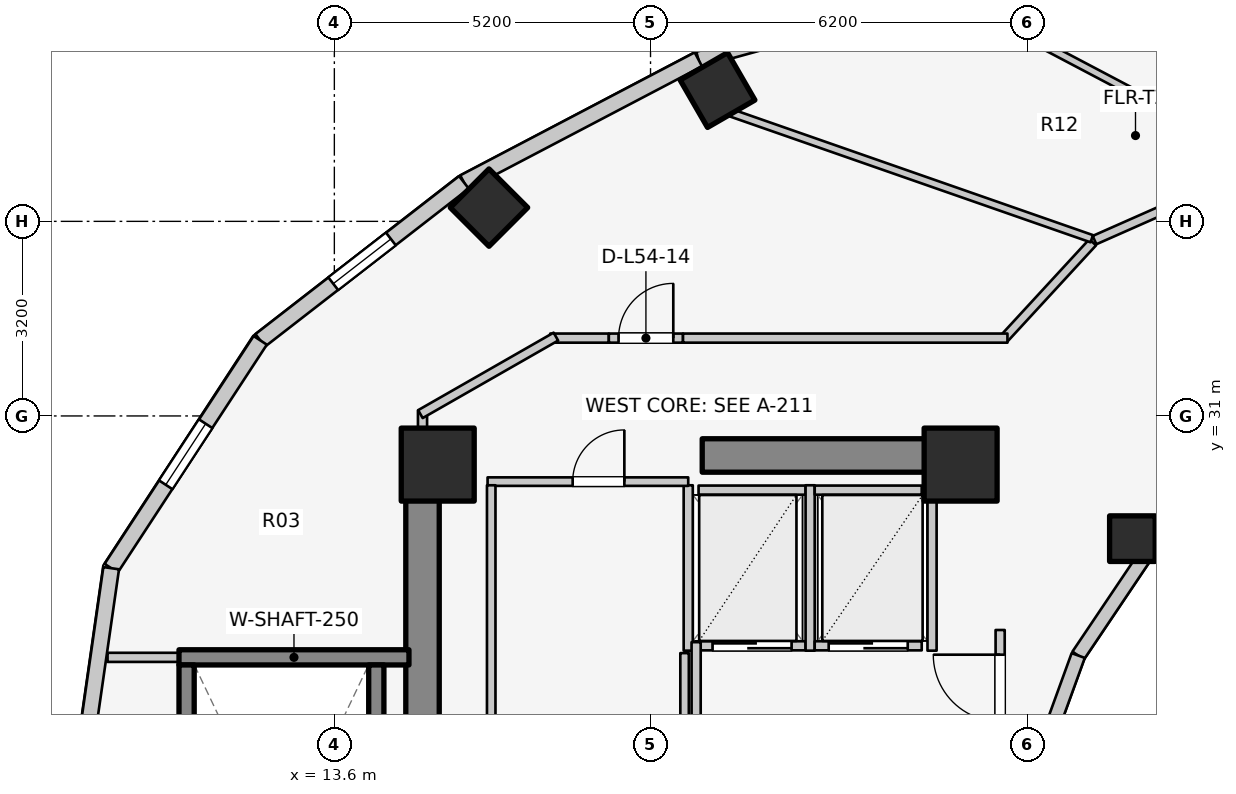
"""IFC4 building model, lengths in metres.
Left out: names, types, materials, properties, quantities, classifications, styles, units other than length and angle.
Written with IfcOpenShell. Run it as: python <this file> out.ifc"""

import sys

from ifc_helpers import new_model, si_unit, direction, frame, frame_2d, origin, origin_2d, place, context, subcontext, project, spatial, rectangle, extrude, element, fill, save


model = new_model("IFC4")
c1 = context("Model", 3, precision=1e-05, world=origin(), true_north=direction((0.0, 1.0)))
c2 = subcontext(c1, "Body", "Model", "MODEL_VIEW")
j1 = project(units=[si_unit("LENGTHUNIT", "METRE"), si_unit("PLANEANGLEUNIT", "RADIAN")], contexts=[c1])
p1 = place(None, origin())
s1 = spatial("IfcSite", under=j1, at=p1, CompositionType="ELEMENT")
p2 = place(p1, origin())
s2 = spatial("IfcBuilding", under=s1, at=p2, CompositionType="ELEMENT")
p3 = place(p2, frame((0.0, 0.0, 177.7)))
s3 = spatial("IfcBuildingStorey", under=s2, at=p3, CompositionType="ELEMENT", Elevation=177.7)
p4 = place(p3, frame((15.05, 17.05, 0.0), z_axis=(0.0, 0.0, 1.0), x_axis=(0.0, 1.0, 0.0)))
e1 = element("IfcWall", 1, at=p4, inside=s3, PredefinedType="SHEAR", context=c2, shape_type="SweptSolid", body=[
    extrude(rectangle(XDim=12.8, YDim=0.55, at=frame_2d((6.4, 0.0))), origin(), (0.0, 0.0, 1.0), 3.1),
])
p5 = place(p3, frame((19.65, 30.35, 0.0), z_axis=(0.0, 0.0, 1.0), x_axis=(1.0, 0.0, 0.0)))
e2 = element("IfcWall", 2, at=p5, inside=s3, PredefinedType="SHEAR", context=c2, shape_type="SweptSolid", body=[
    extrude(rectangle(XDim=4.5, YDim=0.55, at=frame_2d((2.25, 0.0))), origin(), (0.0, 0.0, 1.0), 3.1),
])
p6 = place(p3, frame((11.045, 27.03, 0.0), z_axis=(0.0, 0.0, 1.0), x_axis=(1.0, 0.0, 0.0)))
e3 = element("IfcWall", 3, at=p6, inside=s3, PredefinedType="SOLIDWALL", context=c2, shape_type="SweptSolid", body=[
    extrude(rectangle(XDim=3.782, YDim=0.25, at=frame_2d((1.891, 0.0))), origin(), (0.0, 0.0, 1.0), 3.1),
])
for number, where, z_axis, x_axis in (
    (4, (11.17, 19.095, 0.0), (0.0, 0.0, 1.0), (0.0, 1.0, 0.0)),
    (5, (14.29, 19.095, 0.0), (0.0, 0.0, 1.0), (0.0, 1.0, 0.0)),
):
    element("IfcWall", number, at=place(p3, frame(where, z_axis=z_axis, x_axis=x_axis)), inside=s3, PredefinedType="SOLIDWALL", context=c2, shape_type="SweptSolid", body=[
        extrude(rectangle(XDim=7.81, YDim=0.25, at=frame_2d((3.905, 0.0))), origin(), (0.0, 0.0, 1.0), 3.1),
    ])
for number, where, z_axis, x_axis in (
    (6, (23.9, 30.2, 0.0), (0.0, 0.0, 1.0), (1.0, 0.0, 0.0)),
    (7, (15.3, 30.2, 0.0), (0.0, 0.0, 1.0), (1.0, 0.0, 0.0)),
):
    element("IfcColumn", number, at=place(p3, frame(where, z_axis=z_axis, x_axis=x_axis)), inside=s3, PredefinedType="COLUMN", context=c2, shape_type="SweptSolid", body=[
        extrude(rectangle(XDim=1.2, YDim=1.2, at=origin_2d()), origin(), (0.0, 0.0, 1.0), 3.1),
    ])
p7 = place(p3, frame((19.902, 36.359, 0.0), z_axis=(0.0, 0.0, 1.0), x_axis=(-0.5, 0.866025403784, 0.0)))
e8 = element("IfcColumn", 8, at=p7, inside=s3, PredefinedType="COLUMN", context=c2, shape_type="SweptSolid", body=[
    extrude(rectangle(XDim=0.9, YDim=0.9, at=origin_2d()), origin(), (0.0, 0.0, 1.0), 3.1),
])
p8 = place(p3, frame((26.725, 28.982, 0.0), z_axis=(0.0, 0.0, 1.0), x_axis=(1.0, 0.0, 0.0)))
e9 = element("IfcColumn", 9, at=p8, inside=s3, PredefinedType="COLUMN", context=c2, shape_type="SweptSolid", body=[
    extrude(rectangle(XDim=0.75, YDim=0.75, at=origin_2d()), origin(), (0.0, 0.0, 1.0), 3.1),
])
p9 = place(p3, frame((16.143, 34.427, 0.0), z_axis=(0.0, 0.0, 1.0), x_axis=(-0.707106781187, 0.707106781187, 0.0)))
e10 = element("IfcColumn", 10, at=p9, inside=s3, PredefinedType="COLUMN", context=c2, shape_type="SweptSolid", body=[
    extrude(rectangle(XDim=0.9, YDim=0.9, at=origin_2d()), origin(), (0.0, 0.0, 1.0), 3.1),
])
p10 = place(p3, frame((28.44, 30.032, 0.0), z_axis=(0.0, 0.0, 1.0), x_axis=(-0.752576694707, -0.658504607869, 0.0)))
e11 = element("IfcWall", 11, at=p10, inside=s3, PredefinedType="STANDARD", context=c2, shape_type="SweptSolid", body=[
    extrude(rectangle(XDim=1.959, YDim=0.23, at=frame_2d((0.98, 0.0))), origin(), (0.0, 0.0, 1.0), 1.22),
])
p11 = place(p3, frame((26.965, 28.742, 0.0), z_axis=(0.0, 0.0, 1.0), x_axis=(-0.558197800898, -0.829707909492, 0.0)))
e12 = element("IfcWall", 12, at=p11, inside=s3, PredefinedType="STANDARD", context=c2, shape_type="SweptSolid", body=[
    extrude(rectangle(XDim=2.027, YDim=0.23, at=frame_2d((1.013, 0.0))), origin(), (0.0, 0.0, 1.0), 1.22),
])
p12 = place(p3, frame((25.834, 27.06, 0.0), z_axis=(0.0, 0.0, 1.0), x_axis=(-0.341423187295, -0.93990968033, 0.0)))
e13 = element("IfcWall", 13, at=p12, inside=s3, PredefinedType="STANDARD", context=c2, shape_type="SweptSolid", body=[
    extrude(rectangle(XDim=2.084, YDim=0.23, at=frame_2d((1.042, 0.0))), origin(), (0.0, 0.0, 1.0), 2.56),
])
p13 = place(p3, frame((24.635, 38.257, 0.0), z_axis=(0.0, 0.0, 1.0), x_axis=(-0.963953455704, -0.26607092144, 0.0)))
e14 = element("IfcWall", 14, at=p13, inside=s3, PredefinedType="STANDARD", context=c2, shape_type="SweptSolid", body=[
    extrude(rectangle(XDim=5.237, YDim=0.26, at=frame_2d((2.618, 0.0))), origin(), (0.0, 0.0, 1.0), 1.22),
])
p14 = place(p13, frame((2.018, 0.0, 0.15)))
e15 = element("IfcOpeningElement", 15, at=p14, cuts=e14, PredefinedType="OPENING", context=c2, shape_type="SweptSolid", body=[
    extrude(rectangle(XDim=1.2, YDim=0.9, at=frame_2d((0.6, 0.45))), frame((0.0, 0.14, 0.0), z_axis=(0.0, -1.0, 0.0), x_axis=(1.0, 0.0, 0.0)), (0.0, 0.0, 1.0), 0.28),
])
p15 = place(p3, frame((19.587, 36.863, 0.0), z_axis=(0.0, 0.0, 1.0), x_axis=(-0.885660265226, -0.464333818065, 0.0)))
e16 = element("IfcWall", 16, at=p15, inside=s3, PredefinedType="STANDARD", context=c2, shape_type="SweptSolid", body=[
    extrude(rectangle(XDim=4.354, YDim=0.26, at=frame_2d((2.177, 0.0))), origin(), (0.0, 0.0, 1.0), 1.22),
])
p16 = place(p3, frame((15.731, 34.842, 0.0), z_axis=(0.0, 0.0, 1.0), x_axis=(-0.790185650662, -0.612867552973, 0.0)))
e17 = element("IfcWall", 17, at=p16, inside=s3, PredefinedType="STANDARD", context=c2, shape_type="SweptSolid", body=[
    extrude(rectangle(XDim=4.239, YDim=0.26, at=frame_2d((2.12, 0.0))), origin(), (0.0, 0.0, 1.0), 1.22),
])
p17 = place(p16, frame((1.52, 0.0, 0.15)))
e18 = element("IfcOpeningElement", 18, at=p17, cuts=e17, PredefinedType="OPENING", context=c2, shape_type="SweptSolid", body=[
    extrude(rectangle(XDim=1.2, YDim=0.9, at=frame_2d((0.6, 0.45))), frame((0.0, 0.14, 0.0), z_axis=(0.0, -1.0, 0.0), x_axis=(1.0, 0.0, 0.0)), (0.0, 0.0, 1.0), 0.28),
])
p18 = place(p3, frame((12.381, 32.243, 0.0), z_axis=(0.0, 0.0, 1.0), x_axis=(-0.547456494366, -0.836834145322, 0.0)))
e19 = element("IfcWall", 19, at=p18, inside=s3, PredefinedType="STANDARD", context=c2, shape_type="SweptSolid", body=[
    extrude(rectangle(XDim=4.477, YDim=0.26, at=frame_2d((2.239, 0.0))), origin(), (0.0, 0.0, 1.0), 1.22),
])
p19 = place(p18, frame((1.639, 0.0, 0.15)))
e20 = element("IfcOpeningElement", 20, at=p19, cuts=e19, PredefinedType="OPENING", context=c2, shape_type="SweptSolid", body=[
    extrude(rectangle(XDim=1.2, YDim=0.9, at=frame_2d((0.6, 0.45))), frame((0.0, 0.14, 0.0), z_axis=(0.0, -1.0, 0.0), x_axis=(1.0, 0.0, 0.0)), (0.0, 0.0, 1.0), 0.28),
])
p20 = place(p3, frame((9.93, 28.497, 0.0), z_axis=(0.0, 0.0, 1.0), x_axis=(-0.142227632286, -0.989833976288, 0.0)))
e21 = element("IfcWall", 21, at=p20, inside=s3, PredefinedType="STANDARD", context=c2, shape_type="SweptSolid", body=[
    extrude(rectangle(XDim=5.553, YDim=0.26, at=frame_2d((2.776, 0.0))), origin(), (0.0, 0.0, 1.0), 2.57),
])
p21 = place(p20, frame((2.892, 0.0, 0.75)))
e22 = element("IfcOpeningElement", 22, at=p21, cuts=e21, PredefinedType="OPENING", context=c2, shape_type="SweptSolid", body=[
    extrude(rectangle(XDim=1.2, YDim=1.5, at=frame_2d((0.6, 0.75))), frame((0.0, 0.14, 0.0), z_axis=(0.0, -1.0, 0.0), x_axis=(1.0, 0.0, 0.0)), (0.0, 0.0, 1.0), 0.28),
])
p22 = place(p3, frame((19.59, 27.22, 0.0), z_axis=(0.0, 0.0, 1.0), x_axis=(1.0, 0.0, 0.0)))
e23 = element("IfcWall", 23, at=p22, inside=s3, PredefinedType="SOLIDWALL", context=c2, shape_type="SweptSolid", body=[
    extrude(rectangle(XDim=1.76, YDim=0.15, at=frame_2d((0.88, 0.0))), origin(), (0.0, 0.0, 1.0), 2.575),
])
p23 = place(p22, frame((0.23, 0.0, 0.0)))
e24 = element("IfcOpeningElement", 24, at=p23, cuts=e23, PredefinedType="OPENING", context=c2, shape_type="SweptSolid", body=[
    extrude(rectangle(XDim=1.3, YDim=2.1, at=frame_2d((0.65, 1.05))), frame((0.0, 0.085, 0.0), z_axis=(0.0, -1.0, 0.0), x_axis=(1.0, 0.0, 0.0)), (0.0, 0.0, 1.0), 0.17),
])
p24 = place(p3, frame((19.59, 29.78, 0.0), z_axis=(0.0, 0.0, 1.0), x_axis=(1.0, 0.0, 0.0)))
e25 = element("IfcWall", 25, at=p24, inside=s3, PredefinedType="SOLIDWALL", context=c2, shape_type="SweptSolid", body=[
    extrude(rectangle(XDim=1.76, YDim=0.15, at=frame_2d((0.88, 0.0))), origin(), (0.0, 0.0, 1.0), 2.575),
])
for number, where, z_axis, x_axis in (
    (26, (19.42, 27.14, 0.0), (0.0, 0.0, 1.0), (0.0, 1.0, 0.0)),
    (27, (21.425, 27.14, 0.0), (0.0, 0.0, 1.0), (0.0, 1.0, 0.0)),
):
    element("IfcWall", number, at=place(p3, frame(where, z_axis=z_axis, x_axis=x_axis)), inside=s3, PredefinedType="SOLIDWALL", context=c2, shape_type="SweptSolid", body=[
        extrude(rectangle(XDim=2.72, YDim=0.15, at=frame_2d((1.36, 0.0))), origin(), (0.0, 0.0, 1.0), 2.575),
    ])
p25 = place(p3, frame((21.5, 27.22, 0.0), z_axis=(0.0, 0.0, 1.0), x_axis=(1.0, 0.0, 0.0)))
e28 = element("IfcWall", 28, at=p25, inside=s3, PredefinedType="SOLIDWALL", context=c2, shape_type="SweptSolid", body=[
    extrude(rectangle(XDim=1.76, YDim=0.15, at=frame_2d((0.88, 0.0))), origin(), (0.0, 0.0, 1.0), 2.575),
])
p26 = place(p25, frame((0.23, 0.0, 0.0)))
e29 = element("IfcOpeningElement", 29, at=p26, cuts=e28, PredefinedType="OPENING", context=c2, shape_type="SweptSolid", body=[
    extrude(rectangle(XDim=1.3, YDim=2.1, at=frame_2d((0.65, 1.05))), frame((0.0, 0.085, 0.0), z_axis=(0.0, -1.0, 0.0), x_axis=(1.0, 0.0, 0.0)), (0.0, 0.0, 1.0), 0.17),
])
p27 = place(p3, frame((21.5, 29.78, 0.0), z_axis=(0.0, 0.0, 1.0), x_axis=(1.0, 0.0, 0.0)))
e30 = element("IfcWall", 30, at=p27, inside=s3, PredefinedType="SOLIDWALL", context=c2, shape_type="SweptSolid", body=[
    extrude(rectangle(XDim=1.76, YDim=0.15, at=frame_2d((0.88, 0.0))), origin(), (0.0, 0.0, 1.0), 2.575),
])
p28 = place(p3, frame((23.43, 27.14, 0.0), z_axis=(0.0, 0.0, 1.0), x_axis=(0.0, 1.0, 0.0)))
e31 = element("IfcWall", 31, at=p28, inside=s3, PredefinedType="SOLIDWALL", context=c2, shape_type="SweptSolid", body=[
    extrude(rectangle(XDim=2.72, YDim=0.15, at=frame_2d((1.36, 0.0))), origin(), (0.0, 0.0, 1.0), 2.575),
])
p29 = place(p3, frame((19.55, 24.08, 0.0), z_axis=(0.0, 0.0, 1.0), x_axis=(0.0, 1.0, 0.0)))
e32 = element("IfcWall", 32, at=p29, inside=s3, PredefinedType="PARTITIONING", context=c2, shape_type="SweptSolid", body=[
    extrude(rectangle(XDim=3.2, YDim=0.15, at=frame_2d((1.6, 0.0))), origin(), (0.0, 0.0, 1.0), 2.575),
])
p30 = place(p3, frame((24.55, 24.08, 0.0), z_axis=(0.0, 0.0, 1.0), x_axis=(0.0, 1.0, 0.0)))
e33 = element("IfcWall", 33, at=p30, inside=s3, PredefinedType="PARTITIONING", context=c2, shape_type="SweptSolid", body=[
    extrude(rectangle(XDim=3.4, YDim=0.15, at=frame_2d((1.7, 0.0))), origin(), (0.0, 0.0, 1.0), 2.575),
])
p31 = place(p30, frame((1.894, 0.0, 0.0)))
e34 = element("IfcOpeningElement", 34, at=p31, cuts=e33, PredefinedType="OPENING", context=c2, shape_type="SweptSolid", body=[
    extrude(rectangle(XDim=1.1, YDim=2.1, at=frame_2d((0.55, 1.05))), frame((0.0, 0.085, 0.0), z_axis=(0.0, -1.0, 0.0), x_axis=(1.0, 0.0, 0.0)), (0.0, 0.0, 1.0), 0.17),
])
p32 = place(p3, frame((16.12, 29.92, 0.0), z_axis=(0.0, 0.0, 1.0), x_axis=(1.0, 0.0, 0.0)))
e35 = element("IfcWall", 35, at=p32, inside=s3, PredefinedType="PLUMBINGWALL", context=c2, shape_type="SweptSolid", body=[
    extrude(rectangle(XDim=3.3, YDim=0.14, at=frame_2d((1.65, 0.0))), origin(), (0.0, 0.0, 1.0), 2.575),
])
p33 = place(p32, frame((1.399, 0.0, 0.0)))
e36 = element("IfcOpeningElement", 36, at=p33, cuts=e35, PredefinedType="OPENING", context=c2, shape_type="SweptSolid", body=[
    extrude(rectangle(XDim=0.85, YDim=2.05, at=frame_2d((0.425, 1.025))), frame((0.0, 0.08, 0.0), z_axis=(0.0, -1.0, 0.0), x_axis=(1.0, 0.0, 0.0)), (0.0, 0.0, 1.0), 0.16),
])
p34 = place(p3, frame((16.18, 25.98, 0.0), z_axis=(0.0, 0.0, 1.0), x_axis=(0.0, 1.0, 0.0)))
e37 = element("IfcWall", 37, at=p34, inside=s3, PredefinedType="PLUMBINGWALL", context=c2, shape_type="SweptSolid", body=[
    extrude(rectangle(XDim=3.88, YDim=0.14, at=frame_2d((1.94, 0.0))), origin(), (0.0, 0.0, 1.0), 2.575),
])
p35 = place(p3, frame((19.36, 25.98, 0.0), z_axis=(0.0, 0.0, 1.0), x_axis=(0.0, 1.0, 0.0)))
e38 = element("IfcWall", 38, at=p35, inside=s3, PredefinedType="PLUMBINGWALL", context=c2, shape_type="SweptSolid", body=[
    extrude(rectangle(XDim=1.12, YDim=0.14, at=frame_2d((0.56, 0.0))), origin(), (0.0, 0.0, 1.0), 2.575),
])
p36 = place(p3, frame((9.87, 27.03, 0.0), z_axis=(0.0, 0.0, 1.0), x_axis=(1.0, 0.0, 0.0)))
e39 = element("IfcWall", 39, at=p36, inside=s3, PredefinedType="PARTITIONING", context=c2, shape_type="SweptSolid", body=[
    extrude(rectangle(XDim=1.17, YDim=0.15, at=frame_2d((0.585, 0.0))), origin(), (0.0, 0.0, 1.0), 2.575),
])
p37 = place(p3, frame((15.05, 29.8, 0.0), z_axis=(0.0, 0.0, 1.0), x_axis=(0.0, 1.0, 0.0)))
e40 = element("IfcWall", 40, at=p37, inside=s3, PredefinedType="PARTITIONING", context=c2, shape_type="SweptSolid", body=[
    extrude(rectangle(XDim=1.29, YDim=0.15, at=frame_2d((0.645, 0.0))), origin(), (0.0, 0.0, 1.0), 1.22),
])
p38 = place(p3, frame((26.072, 33.856, 0.0), z_axis=(0.0, 0.0, 1.0), x_axis=(-0.677579737957, -0.735449317567, 0.0)))
e41 = element("IfcWall", 41, at=p38, inside=s3, PredefinedType="PARTITIONING", context=c2, shape_type="SweptSolid", body=[
    extrude(rectangle(XDim=2.173, YDim=0.15, at=frame_2d((1.086, 0.0))), origin(), (0.0, 0.0, 1.0), 1.22),
])
p39 = place(p3, frame((17.15, 32.28, 0.0), z_axis=(0.0, 0.0, 1.0), x_axis=(1.0, 0.0, 0.0)))
e42 = element("IfcWall", 42, at=p39, inside=s3, PredefinedType="PARTITIONING", context=c2, shape_type="SweptSolid", body=[
    extrude(rectangle(XDim=0.964, YDim=0.15, at=frame_2d((0.482, 0.0))), origin(), (0.0, 0.0, 1.0), 2.575),
])
p40 = place(p3, frame((18.114, 32.28, 0.0), z_axis=(0.0, 0.0, 1.0), x_axis=(1.0, 0.0, 0.0)))
e43 = element("IfcWall", 43, at=p40, inside=s3, PredefinedType="PARTITIONING", context=c2, shape_type="SweptSolid", body=[
    extrude(rectangle(XDim=1.22, YDim=0.15, at=frame_2d((0.61, 0.0))), origin(), (0.0, 0.0, 1.0), 2.16),
])
p41 = place(p40, frame((0.16, 0.0, 0.0)))
e44 = element("IfcOpeningElement", 44, at=p41, cuts=e43, PredefinedType="OPENING", context=c2, shape_type="SweptSolid", body=[
    extrude(rectangle(XDim=0.9, YDim=2.1, at=frame_2d((0.45, 1.05))), frame((0.0, 0.085, 0.0), z_axis=(0.0, -1.0, 0.0), x_axis=(1.0, 0.0, 0.0)), (0.0, 0.0, 1.0), 0.17),
])
p42 = place(p3, frame((19.334, 32.28, 0.0), z_axis=(0.0, 0.0, 1.0), x_axis=(1.0, 0.0, 0.0)))
e45 = element("IfcWall", 45, at=p42, inside=s3, PredefinedType="PARTITIONING", context=c2, shape_type="SweptSolid", body=[
    extrude(rectangle(XDim=5.336, YDim=0.15, at=frame_2d((2.668, 0.0))), origin(), (0.0, 0.0, 1.0), 1.22),
])
p43 = place(p3, frame((17.243, 32.305, 0.0), z_axis=(0.0, 0.0, 1.0), x_axis=(-0.867991349648, -0.496579315857, 0.0)))
e46 = element("IfcWall", 46, at=p43, inside=s3, PredefinedType="PARTITIONING", context=c2, shape_type="SweptSolid", body=[
    extrude(rectangle(XDim=2.567, YDim=0.15, at=frame_2d((1.283, 0.0))), origin(), (0.0, 0.0, 1.0), 1.22),
])
p44 = place(p3, frame((28.902, 35.179, 0.0), z_axis=(0.0, 0.0, 1.0), x_axis=(-0.884576855896, 0.466394453241, 0.0)))
e47 = element("IfcWall", 47, at=p44, inside=s3, PredefinedType="PARTITIONING", context=c2, shape_type="SweptSolid", body=[
    extrude(rectangle(XDim=4.487, YDim=0.125, at=frame_2d((2.243, 0.0))), origin(), (0.0, 0.0, 1.0), 1.22),
])
p45 = place(p3, frame((26.057, 33.914, 0.0), z_axis=(0.0, 0.0, 1.0), x_axis=(-0.944182779284, 0.329422038278, 0.0)))
e48 = element("IfcWall", 48, at=p45, inside=s3, PredefinedType="PARTITIONING", context=c2, shape_type="SweptSolid", body=[
    extrude(rectangle(XDim=6.291, YDim=0.125, at=frame_2d((3.146, 0.0))), origin(), (0.0, 0.0, 1.0), 1.22),
])
p46 = place(p3, frame((27.684, 34.592, 0.0), z_axis=(0.0, 0.0, 1.0), x_axis=(-0.914520274566, -0.404540068978, 0.0)))
e49 = element("IfcWall", 49, at=p46, inside=s3, PredefinedType="PARTITIONING", context=c2, shape_type="SweptSolid", body=[
    extrude(rectangle(XDim=1.73, YDim=0.15, at=frame_2d((0.865, 0.0))), origin(), (0.0, 0.0, 1.0), 1.22),
])
p47 = place(p17, origin())
e50 = element("IfcWindow", 50, at=p47, inside=s3, PartitioningType="SINGLE_PANEL", PredefinedType="WINDOW", context=c2, shape_type="SweptSolid", body=[
    extrude(rectangle(XDim=1.2, YDim=0.9, at=frame_2d((0.6, 0.45))), frame((0.0, 0.03, 0.0), z_axis=(0.0, -1.0, 0.0), x_axis=(1.0, 0.0, 0.0)), (0.0, 0.0, 1.0), 0.06),
])
fill(e18, e50)
p48 = place(p19, origin())
e51 = element("IfcWindow", 51, at=p48, inside=s3, PartitioningType="SINGLE_PANEL", PredefinedType="WINDOW", context=c2, shape_type="SweptSolid", body=[
    extrude(rectangle(XDim=1.2, YDim=0.9, at=frame_2d((0.6, 0.45))), frame((0.0, 0.03, 0.0), z_axis=(0.0, -1.0, 0.0), x_axis=(1.0, 0.0, 0.0)), (0.0, 0.0, 1.0), 0.06),
])
fill(e20, e51)
p49 = place(p23, origin())
e52 = element("IfcDoor", 52, at=p49, inside=s3, OperationType="DOUBLE_DOOR_SLIDING", PredefinedType="DOOR", context=c2, shape_type="SweptSolid", body=[
    extrude(rectangle(XDim=1.3, YDim=2.1, at=frame_2d((0.65, 1.05))), frame((0.0, 0.025, 0.0), z_axis=(0.0, -1.0, 0.0), x_axis=(1.0, 0.0, 0.0)), (0.0, 0.0, 1.0), 0.05),
])
fill(e24, e52)
p50 = place(p26, origin())
e53 = element("IfcDoor", 53, at=p50, inside=s3, OperationType="DOUBLE_DOOR_SLIDING", PredefinedType="DOOR", context=c2, shape_type="SweptSolid", body=[
    extrude(rectangle(XDim=1.3, YDim=2.1, at=frame_2d((0.65, 1.05))), frame((0.0, 0.025, 0.0), z_axis=(0.0, -1.0, 0.0), x_axis=(1.0, 0.0, 0.0)), (0.0, 0.0, 1.0), 0.05),
])
fill(e29, e53)
p51 = place(p31, origin())
e54 = element("IfcDoor", 54, at=p51, inside=s3, OperationType="SINGLE_SWING_RIGHT", PredefinedType="DOOR", context=c2, shape_type="SweptSolid", body=[
    extrude(rectangle(XDim=1.1, YDim=2.1, at=frame_2d((0.55, 1.05))), frame((0.0, 0.025, 0.0), z_axis=(0.0, -1.0, 0.0), x_axis=(1.0, 0.0, 0.0)), (0.0, 0.0, 1.0), 0.05),
])
fill(e34, e54)
p52 = place(p33, origin())
e55 = element("IfcDoor", 55, at=p52, inside=s3, OperationType="SINGLE_SWING_RIGHT", PredefinedType="DOOR", context=c2, shape_type="SweptSolid", body=[
    extrude(rectangle(XDim=0.85, YDim=2.05, at=frame_2d((0.425, 1.025))), frame((0.0, 0.025, 0.0), z_axis=(0.0, -1.0, 0.0), x_axis=(1.0, 0.0, 0.0)), (0.0, 0.0, 1.0), 0.05),
])
fill(e36, e55)
p53 = place(p41, origin())
e56 = element("IfcDoor", 56, at=p53, inside=s3, OperationType="SINGLE_SWING_RIGHT", PredefinedType="DOOR", context=c2, shape_type="SweptSolid", body=[
    extrude(rectangle(XDim=0.9, YDim=2.1, at=frame_2d((0.45, 1.05))), frame((0.0, 0.025, 0.0), z_axis=(0.0, -1.0, 0.0), x_axis=(1.0, 0.0, 0.0)), (0.0, 0.0, 1.0), 0.05),
])
fill(e44, e56)
save(model, sys.argv[1])
